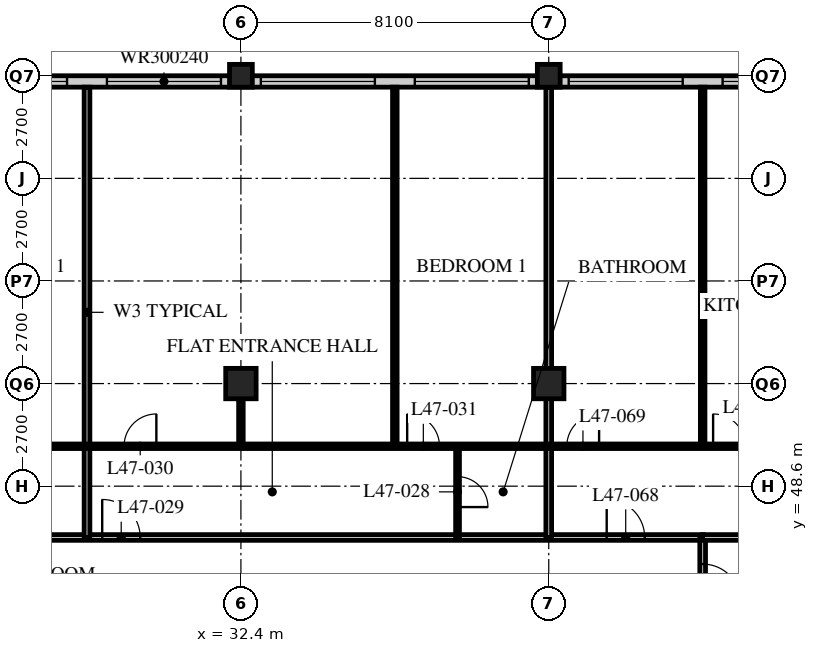
"""IFC4 building model, lengths in metres.
Left out: names, types, materials, properties, quantities, classifications, styles, units other than length and angle.
Written with IfcOpenShell. Run it as: python <this file> out.ifc"""

import sys

from ifc_helpers import new_model, si_unit, direction, frame, frame_2d, origin, origin_2d, place, context, subcontext, project, spatial, rectangle, hollow_rectangle, extrude, element, fill, save


model = new_model("IFC4")
c1 = context("Model", 3, precision=1e-05, world=origin(), true_north=direction((0.0, 1.0)))
c2 = subcontext(c1, "Body", "Model", "MODEL_VIEW")
j1 = project(units=[si_unit("LENGTHUNIT", "METRE"), si_unit("PLANEANGLEUNIT", "RADIAN")], contexts=[c1])
p1 = place(None, origin())
s1 = spatial("IfcSite", under=j1, at=p1, CompositionType="ELEMENT")
p2 = place(p1, origin())
s2 = spatial("IfcBuilding", under=s1, at=p2, CompositionType="ELEMENT")
p3 = place(p2, frame((0.0, 0.0, 184.8)))
s3 = spatial("IfcBuildingStorey", under=s2, at=p3, CompositionType="ELEMENT", Elevation=184.8)
p4 = place(p3, frame((32.4, 51.3, 0.0), z_axis=(0.0, 0.0, 1.0), x_axis=(1.0, 0.0, 0.0)))
e1 = element("IfcColumn", 1, at=p4, inside=s3, PredefinedType="COLUMN", context=c2, shape_type="SweptSolid", body=[
    extrude(hollow_rectangle(XDim=0.8, YDim=0.8, WallThickness=0.08, at=origin_2d()), origin(), (0.0, 0.0, 1.0), 3.6),
])
p5 = place(p3, frame((32.4, 59.4, 0.0), z_axis=(0.0, 0.0, 1.0), x_axis=(1.0, 0.0, 0.0)))
e2 = element("IfcColumn", 2, at=p5, inside=s3, PredefinedType="COLUMN", context=c2, shape_type="SweptSolid", body=[
    extrude(hollow_rectangle(XDim=0.6, YDim=0.6, WallThickness=0.05, at=origin_2d()), origin(), (0.0, 0.0, 1.0), 3.6),
])
p6 = place(p3, frame((40.5, 51.3, 0.0), z_axis=(0.0, 0.0, 1.0), x_axis=(1.0, 0.0, 0.0)))
e3 = element("IfcColumn", 3, at=p6, inside=s3, PredefinedType="COLUMN", context=c2, shape_type="SweptSolid", body=[
    extrude(hollow_rectangle(XDim=0.8, YDim=0.8, WallThickness=0.08, at=origin_2d()), origin(), (0.0, 0.0, 1.0), 3.6),
])
p7 = place(p3, frame((40.5, 59.4, 0.0), z_axis=(0.0, 0.0, 1.0), x_axis=(1.0, 0.0, 0.0)))
e4 = element("IfcColumn", 4, at=p7, inside=s3, PredefinedType="COLUMN", context=c2, shape_type="SweptSolid", body=[
    extrude(hollow_rectangle(XDim=0.6, YDim=0.6, WallThickness=0.05, at=origin_2d()), origin(), (0.0, 0.0, 1.0), 3.6),
])
p8 = place(p3, frame((48.3, 59.25, 0.0), z_axis=(0.0, 0.0, 1.0), x_axis=(-1.0, 0.0, 0.0)))
e5 = element("IfcWall", 5, at=p8, inside=s3, PredefinedType="SOLIDWALL", context=c2, shape_type="SweptSolid", body=[
    extrude(rectangle(XDim=40.2, YDim=0.3, at=frame_2d((20.1, 0.0))), origin(), (0.0, 0.0, 1.0), 3.39),
])
p9 = place(p8, frame((0.225, 0.0, 0.6)))
e6 = element("IfcOpeningElement", 6, at=p9, cuts=e5, PredefinedType="OPENING", context=c2, shape_type="SweptSolid", body=[
    extrude(rectangle(XDim=3.0, YDim=2.4, at=frame_2d((1.5, 1.2))), frame((0.0, 0.16, 0.0), z_axis=(0.0, -1.0, 0.0), x_axis=(1.0, 0.0, 0.0)), (0.0, 0.0, 1.0), 0.32),
])
p10 = place(p8, frame((4.275, 0.0, 0.6)))
e7 = element("IfcOpeningElement", 7, at=p10, cuts=e5, PredefinedType="OPENING", context=c2, shape_type="SweptSolid", body=[
    extrude(rectangle(XDim=3.0, YDim=2.4, at=frame_2d((1.5, 1.2))), frame((0.0, 0.16, 0.0), z_axis=(0.0, -1.0, 0.0), x_axis=(1.0, 0.0, 0.0)), (0.0, 0.0, 1.0), 0.32),
])
p11 = place(p8, frame((8.325, 0.0, 0.6)))
e8 = element("IfcOpeningElement", 8, at=p11, cuts=e5, PredefinedType="OPENING", context=c2, shape_type="SweptSolid", body=[
    extrude(rectangle(XDim=3.0, YDim=2.4, at=frame_2d((1.5, 1.2))), frame((0.0, 0.16, 0.0), z_axis=(0.0, -1.0, 0.0), x_axis=(1.0, 0.0, 0.0)), (0.0, 0.0, 1.0), 0.32),
])
p12 = place(p8, frame((12.375, 0.0, 0.6)))
e9 = element("IfcOpeningElement", 9, at=p12, cuts=e5, PredefinedType="OPENING", context=c2, shape_type="SweptSolid", body=[
    extrude(rectangle(XDim=3.0, YDim=2.4, at=frame_2d((1.5, 1.2))), frame((0.0, 0.16, 0.0), z_axis=(0.0, -1.0, 0.0), x_axis=(1.0, 0.0, 0.0)), (0.0, 0.0, 1.0), 0.32),
])
p13 = place(p8, frame((16.425, 0.0, 0.6)))
e10 = element("IfcOpeningElement", 10, at=p13, cuts=e5, PredefinedType="OPENING", context=c2, shape_type="SweptSolid", body=[
    extrude(rectangle(XDim=3.0, YDim=2.4, at=frame_2d((1.5, 1.2))), frame((0.0, 0.16, 0.0), z_axis=(0.0, -1.0, 0.0), x_axis=(1.0, 0.0, 0.0)), (0.0, 0.0, 1.0), 0.32),
])
p14 = place(p8, frame((20.475, 0.0, 0.6)))
e11 = element("IfcOpeningElement", 11, at=p14, cuts=e5, PredefinedType="OPENING", context=c2, shape_type="SweptSolid", body=[
    extrude(rectangle(XDim=3.0, YDim=2.4, at=frame_2d((1.5, 1.2))), frame((0.0, 0.16, 0.0), z_axis=(0.0, -1.0, 0.0), x_axis=(1.0, 0.0, 0.0)), (0.0, 0.0, 1.0), 0.32),
])
p15 = place(p8, frame((24.525, 0.0, 0.6)))
e12 = element("IfcOpeningElement", 12, at=p15, cuts=e5, PredefinedType="OPENING", context=c2, shape_type="SweptSolid", body=[
    extrude(rectangle(XDim=3.0, YDim=2.4, at=frame_2d((1.5, 1.2))), frame((0.0, 0.16, 0.0), z_axis=(0.0, -1.0, 0.0), x_axis=(1.0, 0.0, 0.0)), (0.0, 0.0, 1.0), 0.32),
])
p16 = place(p8, frame((28.575, 0.0, 0.6)))
e13 = element("IfcOpeningElement", 13, at=p16, cuts=e5, PredefinedType="OPENING", context=c2, shape_type="SweptSolid", body=[
    extrude(rectangle(XDim=3.0, YDim=2.4, at=frame_2d((1.5, 1.2))), frame((0.0, 0.16, 0.0), z_axis=(0.0, -1.0, 0.0), x_axis=(1.0, 0.0, 0.0)), (0.0, 0.0, 1.0), 0.32),
])
p17 = place(p8, frame((32.625, 0.0, 0.6)))
e14 = element("IfcOpeningElement", 14, at=p17, cuts=e5, PredefinedType="OPENING", context=c2, shape_type="SweptSolid", body=[
    extrude(rectangle(XDim=3.0, YDim=2.4, at=frame_2d((1.5, 1.2))), frame((0.0, 0.16, 0.0), z_axis=(0.0, -1.0, 0.0), x_axis=(1.0, 0.0, 0.0)), (0.0, 0.0, 1.0), 0.32),
])
p18 = place(p8, frame((36.675, 0.0, 0.6)))
e15 = element("IfcOpeningElement", 15, at=p18, cuts=e5, PredefinedType="OPENING", context=c2, shape_type="SweptSolid", body=[
    extrude(rectangle(XDim=3.0, YDim=2.4, at=frame_2d((1.5, 1.2))), frame((0.0, 0.16, 0.0), z_axis=(0.0, -1.0, 0.0), x_axis=(1.0, 0.0, 0.0)), (0.0, 0.0, 1.0), 0.32),
])
p19 = place(p3, frame((12.15, 47.25, 0.0), z_axis=(0.0, 0.0, 1.0), x_axis=(1.0, 0.0, 0.0)))
e16 = element("IfcWall", 16, at=p19, inside=s3, PredefinedType="PARTITIONING", context=c2, shape_type="SweptSolid", body=[
    extrude(rectangle(XDim=32.4, YDim=0.15, at=frame_2d((16.2, 0.0))), origin(), (0.0, 0.0, 1.0), 3.39),
])
p20 = place(p19, frame((4.45, 0.0, 0.0)))
e17 = element("IfcOpeningElement", 17, at=p20, cuts=e16, PredefinedType="OPENING", context=c2, shape_type="SweptSolid", body=[
    extrude(rectangle(XDim=1.0, YDim=2.1, at=frame_2d((0.5, 1.05))), frame((0.0, 0.085, 0.0), z_axis=(0.0, -1.0, 0.0), x_axis=(1.0, 0.0, 0.0)), (0.0, 0.0, 1.0), 0.17),
])
p21 = place(p19, frame((16.6, 0.0, 0.0)))
e18 = element("IfcOpeningElement", 18, at=p21, cuts=e16, PredefinedType="OPENING", context=c2, shape_type="SweptSolid", body=[
    extrude(rectangle(XDim=1.0, YDim=2.1, at=frame_2d((0.5, 1.05))), frame((0.0, 0.085, 0.0), z_axis=(0.0, -1.0, 0.0), x_axis=(1.0, 0.0, 0.0)), (0.0, 0.0, 1.0), 0.17),
])
p22 = place(p19, frame((29.875, 0.0, 0.0)))
e19 = element("IfcOpeningElement", 19, at=p22, cuts=e16, PredefinedType="OPENING", context=c2, shape_type="SweptSolid", body=[
    extrude(rectangle(XDim=1.0, YDim=2.1, at=frame_2d((0.5, 1.05))), frame((0.0, 0.085, 0.0), z_axis=(0.0, -1.0, 0.0), x_axis=(1.0, 0.0, 0.0)), (0.0, 0.0, 1.0), 0.17),
])
p23 = place(p19, frame((1.525, 0.0, 0.0)))
e20 = element("IfcOpeningElement", 20, at=p23, cuts=e16, PredefinedType="OPENING", context=c2, shape_type="SweptSolid", body=[
    extrude(rectangle(XDim=1.0, YDim=2.1, at=frame_2d((0.5, 1.05))), frame((0.0, 0.085, 0.0), z_axis=(0.0, -1.0, 0.0), x_axis=(1.0, 0.0, 0.0)), (0.0, 0.0, 1.0), 0.17),
])
p24 = place(p3, frame((44.55, 18.9, 0.0), z_axis=(0.0, 0.0, 1.0), x_axis=(0.0, 1.0, 0.0)))
e21 = element("IfcWall", 21, at=p24, inside=s3, PredefinedType="PARTITIONING", context=c2, shape_type="SweptSolid", body=[
    extrude(rectangle(XDim=28.35, YDim=0.15, at=frame_2d((14.175, 0.0))), origin(), (0.0, 0.0, 1.0), 3.39),
])
p25 = place(p24, frame((0.4, 0.0, 0.0)))
e22 = element("IfcOpeningElement", 22, at=p25, cuts=e21, PredefinedType="OPENING", context=c2, shape_type="SweptSolid", body=[
    extrude(rectangle(XDim=1.0, YDim=2.1, at=frame_2d((0.5, 1.05))), frame((0.0, 0.085, 0.0), z_axis=(0.0, -1.0, 0.0), x_axis=(1.0, 0.0, 0.0)), (0.0, 0.0, 1.0), 0.17),
])
p26 = place(p24, frame((10.45, 0.0, 0.0)))
e23 = element("IfcOpeningElement", 23, at=p26, cuts=e21, PredefinedType="OPENING", context=c2, shape_type="SweptSolid", body=[
    extrude(rectangle(XDim=1.0, YDim=2.1, at=frame_2d((0.5, 1.05))), frame((0.0, 0.085, 0.0), z_axis=(0.0, -1.0, 0.0), x_axis=(1.0, 0.0, 0.0)), (0.0, 0.0, 1.0), 0.17),
])
p27 = place(p24, frame((14.5, 0.0, 0.0)))
e24 = element("IfcOpeningElement", 24, at=p27, cuts=e21, PredefinedType="OPENING", context=c2, shape_type="SweptSolid", body=[
    extrude(rectangle(XDim=1.0, YDim=2.1, at=frame_2d((0.5, 1.05))), frame((0.0, 0.085, 0.0), z_axis=(0.0, -1.0, 0.0), x_axis=(1.0, 0.0, 0.0)), (0.0, 0.0, 1.0), 0.17),
])
p28 = place(p24, frame((16.6, 0.0, 0.0)))
e25 = element("IfcOpeningElement", 25, at=p28, cuts=e21, PredefinedType="OPENING", context=c2, shape_type="SweptSolid", body=[
    extrude(rectangle(XDim=1.0, YDim=2.1, at=frame_2d((0.5, 1.05))), frame((0.0, 0.085, 0.0), z_axis=(0.0, -1.0, 0.0), x_axis=(1.0, 0.0, 0.0)), (0.0, 0.0, 1.0), 0.17),
])
p29 = place(p24, frame((26.65, 0.0, 0.0)))
e26 = element("IfcOpeningElement", 26, at=p29, cuts=e21, PredefinedType="OPENING", context=c2, shape_type="SweptSolid", body=[
    extrude(rectangle(XDim=1.0, YDim=2.1, at=frame_2d((0.5, 1.05))), frame((0.0, 0.085, 0.0), z_axis=(0.0, -1.0, 0.0), x_axis=(1.0, 0.0, 0.0)), (0.0, 0.0, 1.0), 0.17),
])
p30 = place(p3, frame((28.35, 47.25, 0.0), z_axis=(0.0, 0.0, 1.0), x_axis=(0.0, 1.0, 0.0)))
e27 = element("IfcWall", 27, at=p30, inside=s3, PredefinedType="PARTITIONING", context=c2, shape_type="SweptSolid", body=[
    extrude(rectangle(XDim=11.85, YDim=0.15, at=frame_2d((5.925, 0.0))), origin(), (0.0, 0.0, 1.0), 3.39),
])
p31 = place(p3, frame((38.1, 47.25, 0.0), z_axis=(0.0, 0.0, 1.0), x_axis=(0.0, 1.0, 0.0)))
e28 = element("IfcWall", 28, at=p31, inside=s3, PredefinedType="PARTITIONING", context=c2, shape_type="SweptSolid", body=[
    extrude(rectangle(XDim=2.4, YDim=0.1, at=frame_2d((1.2, 0.0))), origin(), (0.0, 0.0, 1.0), 3.39),
])
p32 = place(p31, frame((0.8, 0.0, 0.0)))
e29 = element("IfcOpeningElement", 29, at=p32, cuts=e28, PredefinedType="OPENING", context=c2, shape_type="SweptSolid", body=[
    extrude(rectangle(XDim=0.8, YDim=2.1, at=frame_2d((0.4, 1.05))), frame((0.0, 0.06, 0.0), z_axis=(0.0, -1.0, 0.0), x_axis=(1.0, 0.0, 0.0)), (0.0, 0.0, 1.0), 0.12),
])
for number, where, z_axis, x_axis in (
    (30, (36.45, 49.65, 0.0), (0.0, 0.0, 1.0), (0.0, 1.0, 0.0)),
    (31, (44.55, 49.65, 0.0), (0.0, 0.0, 1.0), (0.0, 1.0, 0.0)),
):
    element("IfcWall", number, at=place(p3, frame(where, z_axis=z_axis, x_axis=x_axis)), inside=s3, PredefinedType="PARTITIONING", context=c2, shape_type="SweptSolid", body=[
        extrude(rectangle(XDim=9.45, YDim=0.12, at=frame_2d((4.725, 0.0))), origin(), (0.0, 0.0, 1.0), 3.39),
    ])
p33 = place(p3, frame((44.55, 47.25, 0.0), z_axis=(0.0, 0.0, 1.0), x_axis=(1.0, 0.0, 0.0)))
e32 = element("IfcWall", 32, at=p33, inside=s3, PredefinedType="PARTITIONING", context=c2, shape_type="SweptSolid", body=[
    extrude(rectangle(XDim=11.85, YDim=0.15, at=frame_2d((5.925, 0.0))), origin(), (0.0, 0.0, 1.0), 3.39),
])
p34 = place(p3, frame((40.5, 47.25, 0.0), z_axis=(0.0, 0.0, 1.0), x_axis=(0.0, 1.0, 0.0)))
e33 = element("IfcWall", 33, at=p34, inside=s3, PredefinedType="PARTITIONING", context=c2, shape_type="SweptSolid", body=[
    extrude(rectangle(XDim=11.85, YDim=0.15, at=frame_2d((5.925, 0.0))), origin(), (0.0, 0.0, 1.0), 2.778),
])
p35 = place(p3, frame((8.15, 49.65, 0.0), z_axis=(0.0, 0.0, 1.0), x_axis=(1.0, 0.0, 0.0)))
e34 = element("IfcWall", 34, at=p35, inside=s3, PredefinedType="PARTITIONING", context=c2, shape_type="SweptSolid", body=[
    extrude(rectangle(XDim=40.4, YDim=0.12, at=frame_2d((20.2, 0.0))), origin(), (0.0, 0.0, 1.0), 3.39),
])
p36 = place(p35, frame((9.025, 0.0, 0.0)))
e35 = element("IfcOpeningElement", 35, at=p36, cuts=e34, PredefinedType="OPENING", context=c2, shape_type="SweptSolid", body=[
    extrude(rectangle(XDim=0.85, YDim=2.1, at=frame_2d((0.425, 1.05))), frame((0.0, 0.07, 0.0), z_axis=(0.0, -1.0, 0.0), x_axis=(1.0, 0.0, 0.0)), (0.0, 0.0, 1.0), 0.14),
])
p37 = place(p35, frame((16.475, 0.0, 0.0)))
e36 = element("IfcOpeningElement", 36, at=p37, cuts=e34, PredefinedType="OPENING", context=c2, shape_type="SweptSolid", body=[
    extrude(rectangle(XDim=0.85, YDim=2.1, at=frame_2d((0.425, 1.05))), frame((0.0, 0.07, 0.0), z_axis=(0.0, -1.0, 0.0), x_axis=(1.0, 0.0, 0.0)), (0.0, 0.0, 1.0), 0.14),
])
p38 = place(p35, frame((21.175, 0.0, 0.0)))
e37 = element("IfcOpeningElement", 37, at=p38, cuts=e34, PredefinedType="OPENING", context=c2, shape_type="SweptSolid", body=[
    extrude(rectangle(XDim=0.85, YDim=2.1, at=frame_2d((0.425, 1.05))), frame((0.0, 0.07, 0.0), z_axis=(0.0, -1.0, 0.0), x_axis=(1.0, 0.0, 0.0)), (0.0, 0.0, 1.0), 0.14),
])
p39 = place(p35, frame((28.625, 0.0, 0.0)))
e38 = element("IfcOpeningElement", 38, at=p39, cuts=e34, PredefinedType="OPENING", context=c2, shape_type="SweptSolid", body=[
    extrude(rectangle(XDim=0.85, YDim=2.1, at=frame_2d((0.425, 1.05))), frame((0.0, 0.07, 0.0), z_axis=(0.0, -1.0, 0.0), x_axis=(1.0, 0.0, 0.0)), (0.0, 0.0, 1.0), 0.14),
])
p40 = place(p35, frame((32.825, 0.0, 0.0)))
e39 = element("IfcOpeningElement", 39, at=p40, cuts=e34, PredefinedType="OPENING", context=c2, shape_type="SweptSolid", body=[
    extrude(rectangle(XDim=0.85, YDim=2.1, at=frame_2d((0.425, 1.05))), frame((0.0, 0.07, 0.0), z_axis=(0.0, -1.0, 0.0), x_axis=(1.0, 0.0, 0.0)), (0.0, 0.0, 1.0), 0.14),
])
p41 = place(p35, frame((36.675, 0.0, 0.0)))
e40 = element("IfcOpeningElement", 40, at=p41, cuts=e34, PredefinedType="OPENING", context=c2, shape_type="SweptSolid", body=[
    extrude(rectangle(XDim=0.85, YDim=2.1, at=frame_2d((0.425, 1.05))), frame((0.0, 0.07, 0.0), z_axis=(0.0, -1.0, 0.0), x_axis=(1.0, 0.0, 0.0)), (0.0, 0.0, 1.0), 0.14),
])
p42 = place(p35, frame((6.725, 0.0, 0.0)))
e41 = element("IfcOpeningElement", 41, at=p42, cuts=e34, PredefinedType="OPENING", context=c2, shape_type="SweptSolid", body=[
    extrude(rectangle(XDim=0.85, YDim=2.1, at=frame_2d((0.425, 1.05))), frame((0.0, 0.07, 0.0), z_axis=(0.0, -1.0, 0.0), x_axis=(1.0, 0.0, 0.0)), (0.0, 0.0, 1.0), 0.14),
])
p43 = place(p35, frame((2.875, 0.0, 0.0)))
e42 = element("IfcOpeningElement", 42, at=p43, cuts=e34, PredefinedType="OPENING", context=c2, shape_type="SweptSolid", body=[
    extrude(rectangle(XDim=0.85, YDim=2.1, at=frame_2d((0.425, 1.05))), frame((0.0, 0.07, 0.0), z_axis=(0.0, -1.0, 0.0), x_axis=(1.0, 0.0, 0.0)), (0.0, 0.0, 1.0), 0.14),
])
p44 = place(p3, frame((32.4, 49.65, 0.0), z_axis=(0.0, 0.0, 1.0), x_axis=(0.0, 1.0, 0.0)))
e43 = element("IfcWall", 43, at=p44, inside=s3, PredefinedType="PARTITIONING", context=c2, shape_type="SweptSolid", body=[
    extrude(rectangle(XDim=1.25, YDim=0.12, at=frame_2d((0.625, 0.0))), origin(), (0.0, 0.0, 1.0), 2.778),
])
p45 = place(p9, origin())
e44 = element("IfcWindow", 44, at=p45, inside=s3, PartitioningType="SINGLE_PANEL", PredefinedType="WINDOW", context=c2, shape_type="SweptSolid", body=[
    extrude(rectangle(XDim=3.0, YDim=2.4, at=frame_2d((1.5, 1.2))), frame((0.0, 0.03, 0.0), z_axis=(0.0, -1.0, 0.0), x_axis=(1.0, 0.0, 0.0)), (0.0, 0.0, 1.0), 0.06),
])
fill(e6, e44)
p46 = place(p10, origin())
e45 = element("IfcWindow", 45, at=p46, inside=s3, PartitioningType="SINGLE_PANEL", PredefinedType="WINDOW", context=c2, shape_type="SweptSolid", body=[
    extrude(rectangle(XDim=3.0, YDim=2.4, at=frame_2d((1.5, 1.2))), frame((0.0, 0.03, 0.0), z_axis=(0.0, -1.0, 0.0), x_axis=(1.0, 0.0, 0.0)), (0.0, 0.0, 1.0), 0.06),
])
fill(e7, e45)
p47 = place(p11, origin())
e46 = element("IfcWindow", 46, at=p47, inside=s3, PartitioningType="SINGLE_PANEL", PredefinedType="WINDOW", context=c2, shape_type="SweptSolid", body=[
    extrude(rectangle(XDim=3.0, YDim=2.4, at=frame_2d((1.5, 1.2))), frame((0.0, 0.03, 0.0), z_axis=(0.0, -1.0, 0.0), x_axis=(1.0, 0.0, 0.0)), (0.0, 0.0, 1.0), 0.06),
])
fill(e8, e46)
p48 = place(p12, origin())
e47 = element("IfcWindow", 47, at=p48, inside=s3, PartitioningType="SINGLE_PANEL", PredefinedType="WINDOW", context=c2, shape_type="SweptSolid", body=[
    extrude(rectangle(XDim=3.0, YDim=2.4, at=frame_2d((1.5, 1.2))), frame((0.0, 0.03, 0.0), z_axis=(0.0, -1.0, 0.0), x_axis=(1.0, 0.0, 0.0)), (0.0, 0.0, 1.0), 0.06),
])
fill(e9, e47)
p49 = place(p13, origin())
e48 = element("IfcWindow", 48, at=p49, inside=s3, PartitioningType="SINGLE_PANEL", PredefinedType="WINDOW", context=c2, shape_type="SweptSolid", body=[
    extrude(rectangle(XDim=3.0, YDim=2.4, at=frame_2d((1.5, 1.2))), frame((0.0, 0.03, 0.0), z_axis=(0.0, -1.0, 0.0), x_axis=(1.0, 0.0, 0.0)), (0.0, 0.0, 1.0), 0.06),
])
fill(e10, e48)
p50 = place(p14, origin())
e49 = element("IfcWindow", 49, at=p50, inside=s3, PartitioningType="SINGLE_PANEL", PredefinedType="WINDOW", context=c2, shape_type="SweptSolid", body=[
    extrude(rectangle(XDim=3.0, YDim=2.4, at=frame_2d((1.5, 1.2))), frame((0.0, 0.03, 0.0), z_axis=(0.0, -1.0, 0.0), x_axis=(1.0, 0.0, 0.0)), (0.0, 0.0, 1.0), 0.06),
])
fill(e11, e49)
p51 = place(p32, origin())
e50 = element("IfcDoor", 50, at=p51, inside=s3, OperationType="SINGLE_SWING_RIGHT", PredefinedType="DOOR", context=c2, shape_type="SweptSolid", body=[
    extrude(rectangle(XDim=0.8, YDim=2.1, at=frame_2d((0.4, 1.05))), frame((0.0, 0.025, 0.0), z_axis=(0.0, -1.0, 0.0), x_axis=(1.0, 0.0, 0.0)), (0.0, 0.0, 1.0), 0.05),
])
fill(e29, e50)
p52 = place(p21, origin())
e51 = element("IfcDoor", 51, at=p52, inside=s3, OperationType="SINGLE_SWING_LEFT", PredefinedType="DOOR", context=c2, shape_type="SweptSolid", body=[
    extrude(rectangle(XDim=1.0, YDim=2.1, at=frame_2d((0.5, 1.05))), frame((0.0, 0.025, 0.0), z_axis=(0.0, -1.0, 0.0), x_axis=(1.0, 0.0, 0.0)), (0.0, 0.0, 1.0), 0.05),
])
fill(e18, e51)
p53 = place(p38, origin())
e52 = element("IfcDoor", 52, at=p53, inside=s3, OperationType="SINGLE_SWING_RIGHT", PredefinedType="DOOR", context=c2, shape_type="SweptSolid", body=[
    extrude(rectangle(XDim=0.85, YDim=2.1, at=frame_2d((0.425, 1.05))), frame((0.0, 0.025, 0.0), z_axis=(0.0, -1.0, 0.0), x_axis=(1.0, 0.0, 0.0)), (0.0, 0.0, 1.0), 0.05),
])
fill(e37, e52)
p54 = place(p39, origin())
e53 = element("IfcDoor", 53, at=p54, inside=s3, OperationType="SINGLE_SWING_LEFT", PredefinedType="DOOR", context=c2, shape_type="SweptSolid", body=[
    extrude(rectangle(XDim=0.85, YDim=2.1, at=frame_2d((0.425, 1.05))), frame((0.0, 0.025, 0.0), z_axis=(0.0, -1.0, 0.0), x_axis=(1.0, 0.0, 0.0)), (0.0, 0.0, 1.0), 0.05),
])
fill(e38, e53)
p55 = place(p29, origin())
e54 = element("IfcDoor", 54, at=p55, inside=s3, OperationType="SINGLE_SWING_RIGHT", PredefinedType="DOOR", context=c2, shape_type="SweptSolid", body=[
    extrude(rectangle(XDim=1.0, YDim=2.1, at=frame_2d((0.5, 1.05))), frame((0.0, 0.025, 0.0), z_axis=(0.0, -1.0, 0.0), x_axis=(1.0, 0.0, 0.0)), (0.0, 0.0, 1.0), 0.05),
])
fill(e26, e54)
p56 = place(p22, origin())
e55 = element("IfcDoor", 55, at=p56, inside=s3, OperationType="SINGLE_SWING_LEFT", PredefinedType="DOOR", context=c2, shape_type="SweptSolid", body=[
    extrude(rectangle(XDim=1.0, YDim=2.1, at=frame_2d((0.5, 1.05))), frame((0.0, 0.025, 0.0), z_axis=(0.0, -1.0, 0.0), x_axis=(1.0, 0.0, 0.0)), (0.0, 0.0, 1.0), 0.05),
])
fill(e19, e55)
p57 = place(p40, origin())
e56 = element("IfcDoor", 56, at=p57, inside=s3, OperationType="SINGLE_SWING_RIGHT", PredefinedType="DOOR", context=c2, shape_type="SweptSolid", body=[
    extrude(rectangle(XDim=0.85, YDim=2.1, at=frame_2d((0.425, 1.05))), frame((0.0, 0.025, 0.0), z_axis=(0.0, -1.0, 0.0), x_axis=(1.0, 0.0, 0.0)), (0.0, 0.0, 1.0), 0.05),
])
fill(e39, e56)
p58 = place(p41, origin())
e57 = element("IfcDoor", 57, at=p58, inside=s3, OperationType="SINGLE_SWING_LEFT", PredefinedType="DOOR", context=c2, shape_type="SweptSolid", body=[
    extrude(rectangle(XDim=0.85, YDim=2.1, at=frame_2d((0.425, 1.05))), frame((0.0, 0.025, 0.0), z_axis=(0.0, -1.0, 0.0), x_axis=(1.0, 0.0, 0.0)), (0.0, 0.0, 1.0), 0.05),
])
fill(e40, e57)
save(model, sys.argv[1])
